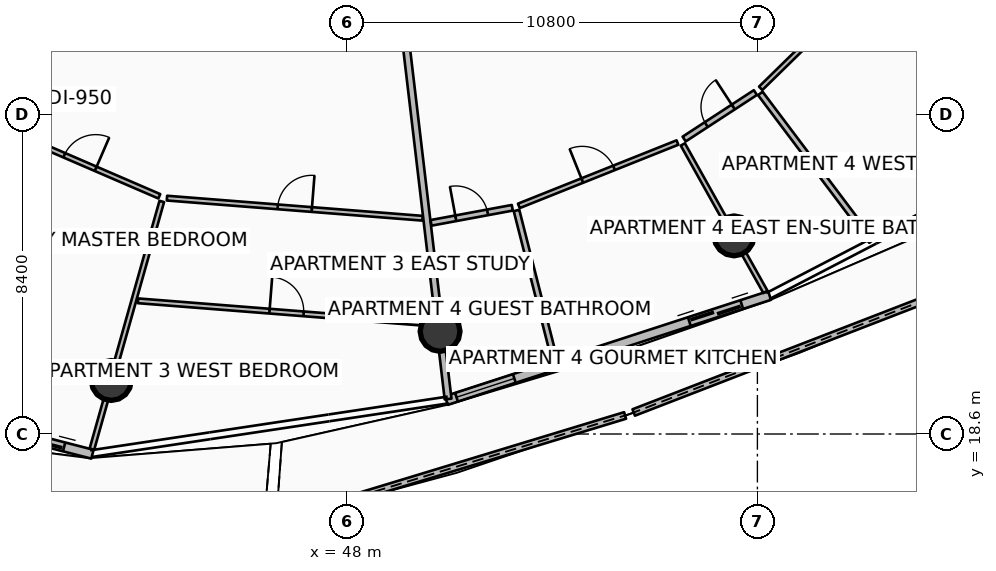
"""IFC4 building model, lengths in metres.
Left out: names, types, materials, properties, quantities, classifications, styles, units other than length and angle.
Written with IfcOpenShell. Run it as: python <this file> out.ifc"""

import sys

from ifc_helpers import new_model, si_unit, direction, frame, frame_2d, origin, origin_2d, place, context, subcontext, project, spatial, polyline, rectangle, circle, outline, extrude, element, fill, save


model = new_model("IFC4")
c1 = context("Model", 3, precision=1e-05, world=origin(), true_north=direction((0.0, 1.0)))
c2 = subcontext(c1, "Body", "Model", "MODEL_VIEW")
j1 = project(units=[si_unit("LENGTHUNIT", "METRE"), si_unit("PLANEANGLEUNIT", "RADIAN")], contexts=[c1])
p1 = place(None, origin())
s1 = spatial("IfcSite", under=j1, at=p1, CompositionType="ELEMENT")
p2 = place(p1, origin())
s2 = spatial("IfcBuilding", under=s1, at=p2, CompositionType="ELEMENT")
p3 = place(p2, frame((0.0, 0.0, 210.3)))
s3 = spatial("IfcBuildingStorey", under=s2, at=p3, CompositionType="ELEMENT", Elevation=210.3)
for number, where, z_axis, x_axis in (
    (1, (41.798, 20.008, 0.0), (0.0, 0.0, 1.0), (1.0, 0.0, 0.0)),
    (2, (50.45, 21.3, 0.0), (0.0, 0.0, 1.0), (1.0, 0.0, 0.0)),
    (3, (58.185, 23.814, 0.0), (0.0, 0.0, 1.0), (1.0, 0.0, 0.0)),
):
    element("IfcColumn", number, at=place(p3, frame(where, z_axis=z_axis, x_axis=x_axis)), inside=s3, PredefinedType="COLUMN", context=c2, shape_type="SweptSolid", body=[
        extrude(circle(Radius=0.525, at=origin_2d()), origin(), (0.0, 0.0, 1.0), 3.5),
    ])
p4 = place(p3, frame((46.135, 16.298, 0.0), z_axis=(0.0, 0.0, 1.0), x_axis=(0.956822857871, 0.290671668135, 0.0)))
e4 = element("IfcWall", 4, at=p4, inside=s3, PredefinedType="PARAPET", context=c2, shape_type="SweptSolid", body=[
    extrude(outline(polyline([(0.0, 0.0), (9.598, 0.0), (9.598, 1.148), (4.799, 1.284), (0.0, 1.483), (0.0, 0.0)])), frame((0.0, 0.09, 0.0), z_axis=(0.0, -1.0, 0.0), x_axis=(1.0, 0.0, 0.0)), (0.0, 0.0, 1.0), 0.18),
])
p5 = place(p3, frame((55.545, 19.166, 0.0), z_axis=(0.0, 0.0, 1.0), x_axis=(0.932733135956, 0.360567465378, 0.0)))
e5 = element("IfcWall", 5, at=p5, inside=s3, PredefinedType="PARAPET", context=c2, shape_type="SweptSolid", body=[
    extrude(outline(polyline([(0.0, 0.0), (9.473, 0.0), (9.473, 1.224), (4.736, 1.127), (0.0, 1.148), (0.0, 0.0)])), frame((0.0, 0.09, 0.0), z_axis=(0.0, -1.0, 0.0), x_axis=(1.0, 0.0, 0.0)), (0.0, 0.0, 1.0), 0.18),
])
p6 = place(p3, frame((31.14, 20.687, 0.0), z_axis=(0.0, 0.0, 1.0), x_axis=(0.968374028006, -0.249502989727, 0.0)))
e6 = element("IfcWall", 6, at=p6, inside=s3, PredefinedType="SOLIDWALL", context=c2, shape_type="SweptSolid", body=[
    extrude(rectangle(XDim=10.494, YDim=0.24, at=frame_2d((5.247, 0.0))), origin(), (0.0, 0.0, 1.0), 2.45),
])
p7 = place(p6, frame((8.274, 0.0, 0.0)))
e7 = element("IfcOpeningElement", 7, at=p7, cuts=e6, PredefinedType="OPENING", context=c2, shape_type="SweptSolid", body=[
    extrude(rectangle(XDim=1.45, YDim=2.15, at=frame_2d((0.725, 1.075))), frame((0.0, 0.13, 0.0), z_axis=(0.0, -1.0, 0.0), x_axis=(1.0, 0.0, 0.0)), (0.0, 0.0, 1.0), 0.26),
])
p8 = place(p6, frame((0.28, 0.0, 0.65)))
e8 = element("IfcOpeningElement", 8, at=p8, cuts=e6, PredefinedType="OPENING", context=c2, shape_type="SweptSolid", body=[
    extrude(rectangle(XDim=1.6, YDim=1.5, at=frame_2d((0.8, 0.75))), frame((0.0, 0.13, 0.0), z_axis=(0.0, -1.0, 0.0), x_axis=(1.0, 0.0, 0.0)), (0.0, 0.0, 1.0), 0.26),
])
p9 = place(p3, frame((50.616, 19.481, 0.0), z_axis=(0.0, 0.0, 1.0), x_axis=(0.951058543936, 0.309010753869, 0.0)))
e9 = element("IfcWall", 9, at=p9, inside=s3, PredefinedType="SOLIDWALL", context=c2, shape_type="SweptSolid", body=[
    extrude(rectangle(XDim=8.942, YDim=0.24, at=frame_2d((4.471, 0.0))), origin(), (0.0, 0.0, 1.0), 2.45),
])
p10 = place(p9, frame((6.722, 0.0, 0.0)))
e10 = element("IfcOpeningElement", 10, at=p10, cuts=e9, PredefinedType="OPENING", context=c2, shape_type="SweptSolid", body=[
    extrude(rectangle(XDim=1.45, YDim=2.15, at=frame_2d((0.725, 1.075))), frame((0.0, 0.13, 0.0), z_axis=(0.0, -1.0, 0.0), x_axis=(1.0, 0.0, 0.0)), (0.0, 0.0, 1.0), 0.26),
])
p11 = place(p9, frame((0.28, 0.0, 0.65)))
e11 = element("IfcOpeningElement", 11, at=p11, cuts=e9, PredefinedType="OPENING", context=c2, shape_type="SweptSolid", body=[
    extrude(rectangle(XDim=1.6, YDim=1.5, at=frame_2d((0.8, 0.75))), frame((0.0, 0.13, 0.0), z_axis=(0.0, -1.0, 0.0), x_axis=(1.0, 0.0, 0.0)), (0.0, 0.0, 1.0), 0.26),
])
p12 = place(p3, frame((49.037, 33.241, 0.0), z_axis=(0.0, 0.0, 1.0), x_axis=(0.11753742895, -0.993068453228, 0.0)))
e12 = element("IfcWall", 12, at=p12, inside=s3, PredefinedType="PARTITIONING", context=c2, shape_type="SweptSolid", body=[
    extrude(rectangle(XDim=13.815, YDim=0.18, at=frame_2d((6.907, 0.0))), origin(), (0.0, 0.0, 1.0), 2.94),
])
p13 = place(p3, frame((38.888, 26.657, 0.0), z_axis=(0.0, 0.0, 1.0), x_axis=(0.918052580004, -0.396458648976, 0.0)))
e13 = element("IfcWall", 13, at=p13, inside=s3, PredefinedType="PARTITIONING", context=c2, shape_type="SweptSolid", body=[
    extrude(rectangle(XDim=4.546, YDim=0.125, at=frame_2d((2.273, 0.0))), origin(), (0.0, 0.0, 1.0), 2.94),
])
p14 = place(p13, frame((1.823, 0.0, 0.0)))
e14 = element("IfcOpeningElement", 14, at=p14, cuts=e13, PredefinedType="OPENING", context=c2, shape_type="SweptSolid", body=[
    extrude(rectangle(XDim=0.9, YDim=2.08, at=frame_2d((0.45, 1.04))), frame((0.0, 0.073, 0.0), z_axis=(0.0, -1.0, 0.0), x_axis=(1.0, 0.0, 0.0)), (0.0, 0.0, 1.0), 0.145),
])
p15 = place(p3, frame((43.126, 24.719, 0.0), z_axis=(0.0, 0.0, 1.0), x_axis=(-0.271429339147, -0.962458369931, 0.0)))
e15 = element("IfcWall", 15, at=p15, inside=s3, PredefinedType="PARTITIONING", context=c2, shape_type="SweptSolid", body=[
    extrude(rectangle(XDim=6.772, YDim=0.125, at=frame_2d((3.386, 0.0))), origin(), (0.0, 0.0, 1.0), 2.94),
])
p16 = place(p3, frame((43.263, 24.807, 0.0), z_axis=(0.0, 0.0, 1.0), x_axis=(0.996914936791, -0.078489545824, 0.0)))
e16 = element("IfcWall", 16, at=p16, inside=s3, PredefinedType="PARTITIONING", context=c2, shape_type="SweptSolid", body=[
    extrude(rectangle(XDim=6.747, YDim=0.125, at=frame_2d((3.373, 0.0))), origin(), (0.0, 0.0, 1.0), 2.94),
])
p17 = place(p16, frame((2.923, 0.0, 0.0)))
e17 = element("IfcOpeningElement", 17, at=p17, cuts=e16, PredefinedType="OPENING", context=c2, shape_type="SweptSolid", body=[
    extrude(rectangle(XDim=0.9, YDim=2.08, at=frame_2d((0.45, 1.04))), frame((0.0, 0.073, 0.0), z_axis=(0.0, -1.0, 0.0), x_axis=(1.0, 0.0, 0.0)), (0.0, 0.0, 1.0), 0.145),
])
p18 = place(p3, frame((42.501, 22.105, 0.0), z_axis=(0.0, 0.0, 1.0), x_axis=(0.996917595152, -0.078455774017, 0.0)))
e18 = element("IfcWall", 18, at=p18, inside=s3, PredefinedType="PARTITIONING", context=c2, shape_type="SweptSolid", body=[
    extrude(rectangle(XDim=7.842, YDim=0.125, at=frame_2d((3.921, 0.0))), origin(), (0.0, 0.0, 1.0), 2.94),
])
p19 = place(p18, frame((3.471, 0.0, 0.0)))
e19 = element("IfcOpeningElement", 19, at=p19, cuts=e18, PredefinedType="OPENING", context=c2, shape_type="SweptSolid", body=[
    extrude(rectangle(XDim=0.9, YDim=2.08, at=frame_2d((0.45, 1.04))), frame((0.0, 0.073, 0.0), z_axis=(0.0, -1.0, 0.0), x_axis=(1.0, 0.0, 0.0)), (0.0, 0.0, 1.0), 0.145),
])
p20 = place(p3, frame((50.212, 24.156, 0.0), z_axis=(0.0, 0.0, 1.0), x_axis=(0.983198523617, 0.182539483832, 0.0)))
e20 = element("IfcWall", 20, at=p20, inside=s3, PredefinedType="PARTITIONING", context=c2, shape_type="SweptSolid", body=[
    extrude(rectangle(XDim=2.175, YDim=0.15, at=frame_2d((1.087, 0.0))), origin(), (0.0, 0.0, 1.0), 2.94),
])
p21 = place(p20, frame((0.662, 0.0, 0.0)))
e21 = element("IfcOpeningElement", 21, at=p21, cuts=e20, PredefinedType="OPENING", context=c2, shape_type="SweptSolid", body=[
    extrude(rectangle(XDim=0.85, YDim=2.06, at=frame_2d((0.425, 1.03))), frame((0.0, 0.085, 0.0), z_axis=(0.0, -1.0, 0.0), x_axis=(1.0, 0.0, 0.0)), (0.0, 0.0, 1.0), 0.17),
])
p22 = place(p3, frame((52.461, 24.482, 0.0), z_axis=(0.0, 0.0, 1.0), x_axis=(0.246781707717, -0.969071095811, 0.0)))
e22 = element("IfcWall", 22, at=p22, inside=s3, PredefinedType="PARTITIONING", context=c2, shape_type="SweptSolid", body=[
    extrude(rectangle(XDim=4.07, YDim=0.15, at=frame_2d((2.035, 0.0))), origin(), (0.0, 0.0, 1.0), 2.94),
])
p23 = place(p3, frame((52.523, 24.603, 0.0), z_axis=(0.0, 0.0, 1.0), x_axis=(0.928686374253, 0.370866038182, 0.0)))
e23 = element("IfcWall", 23, at=p23, inside=s3, PredefinedType="PARTITIONING", context=c2, shape_type="SweptSolid", body=[
    extrude(rectangle(XDim=4.494, YDim=0.125, at=frame_2d((2.247, 0.0))), origin(), (0.0, 0.0, 1.0), 2.94),
])
p24 = place(p23, frame((1.797, 0.0, 0.0)))
e24 = element("IfcOpeningElement", 24, at=p24, cuts=e23, PredefinedType="OPENING", context=c2, shape_type="SweptSolid", body=[
    extrude(rectangle(XDim=0.9, YDim=2.08, at=frame_2d((0.45, 1.04))), frame((0.0, 0.073, 0.0), z_axis=(0.0, -1.0, 0.0), x_axis=(1.0, 0.0, 0.0)), (0.0, 0.0, 1.0), 0.145),
])
p25 = place(p3, frame((56.838, 26.219, 0.0), z_axis=(0.0, 0.0, 1.0), x_axis=(0.488608382443, -0.872503208365, 0.0)))
e25 = element("IfcWall", 25, at=p25, inside=s3, PredefinedType="PARTITIONING", context=c2, shape_type="SweptSolid", body=[
    extrude(rectangle(XDim=4.448, YDim=0.125, at=frame_2d((2.224, 0.0))), origin(), (0.0, 0.0, 1.0), 2.94),
])
p26 = place(p3, frame((56.873, 26.361, 0.0), z_axis=(0.0, 0.0, 1.0), x_axis=(0.837497725381, 0.54644081105, 0.0)))
e26 = element("IfcWall", 26, at=p26, inside=s3, PredefinedType="PARTITIONING", context=c2, shape_type="SweptSolid", body=[
    extrude(rectangle(XDim=2.238, YDim=0.15, at=frame_2d((1.119, 0.0))), origin(), (0.0, 0.0, 1.0), 2.94),
])
p27 = place(p26, frame((0.694, 0.0, 0.0)))
e27 = element("IfcOpeningElement", 27, at=p27, cuts=e26, PredefinedType="OPENING", context=c2, shape_type="SweptSolid", body=[
    extrude(rectangle(XDim=0.85, YDim=2.06, at=frame_2d((0.425, 1.03))), frame((0.0, 0.085, 0.0), z_axis=(0.0, -1.0, 0.0), x_axis=(1.0, 0.0, 0.0)), (0.0, 0.0, 1.0), 0.17),
])
p28 = place(p3, frame((58.876, 27.561, 0.0), z_axis=(0.0, 0.0, 1.0), x_axis=(0.601652635262, -0.798757852219, 0.0)))
e28 = element("IfcWall", 28, at=p28, inside=s3, PredefinedType="PARTITIONING", context=c2, shape_type="SweptSolid", body=[
    extrude(rectangle(XDim=4.865, YDim=0.15, at=frame_2d((2.433, 0.0))), origin(), (0.0, 0.0, 1.0), 2.94),
])
p29 = place(p3, frame((58.887, 27.696, 0.0), z_axis=(0.0, 0.0, 1.0), x_axis=(0.714833426799, 0.699294767556, 0.0)))
e29 = element("IfcWall", 29, at=p29, inside=s3, PredefinedType="PARTITIONING", context=c2, shape_type="SweptSolid", body=[
    extrude(rectangle(XDim=4.431, YDim=0.125, at=frame_2d((2.215, 0.0))), origin(), (0.0, 0.0, 1.0), 2.94),
])
p30 = place(p29, frame((1.765, 0.0, 0.0)))
e30 = element("IfcOpeningElement", 30, at=p30, cuts=e29, PredefinedType="OPENING", context=c2, shape_type="SweptSolid", body=[
    extrude(rectangle(XDim=0.9, YDim=2.08, at=frame_2d((0.45, 1.04))), frame((0.0, 0.073, 0.0), z_axis=(0.0, -1.0, 0.0), x_axis=(1.0, 0.0, 0.0)), (0.0, 0.0, 1.0), 0.145),
])
p31 = place(p3, frame((62.204, 30.802, 0.0), z_axis=(0.0, 0.0, 1.0), x_axis=(0.785315561472, -0.619095686393, 0.0)))
e31 = element("IfcWall", 31, at=p31, inside=s3, PredefinedType="PARTITIONING", context=c2, shape_type="SweptSolid", body=[
    extrude(rectangle(XDim=6.74, YDim=0.125, at=frame_2d((3.37, 0.0))), origin(), (0.0, 0.0, 1.0), 2.94),
])
p32 = place(p7, origin())
e32 = element("IfcDoor", 32, at=p32, inside=s3, OperationType="DOUBLE_DOOR_SLIDING", PredefinedType="DOOR", context=c2, shape_type="SweptSolid", body=[
    extrude(rectangle(XDim=1.45, YDim=2.15, at=frame_2d((0.725, 1.075))), frame((0.0, 0.025, 0.0), z_axis=(0.0, -1.0, 0.0), x_axis=(1.0, 0.0, 0.0)), (0.0, 0.0, 1.0), 0.05),
])
fill(e7, e32)
p33 = place(p10, origin())
e33 = element("IfcDoor", 33, at=p33, inside=s3, OperationType="DOUBLE_DOOR_SLIDING", PredefinedType="DOOR", context=c2, shape_type="SweptSolid", body=[
    extrude(rectangle(XDim=1.45, YDim=2.15, at=frame_2d((0.725, 1.075))), frame((0.0, 0.025, 0.0), z_axis=(0.0, -1.0, 0.0), x_axis=(1.0, 0.0, 0.0)), (0.0, 0.0, 1.0), 0.05),
])
fill(e10, e33)
p34 = place(p11, origin())
e34 = element("IfcWindow", 34, at=p34, inside=s3, PartitioningType="SINGLE_PANEL", PredefinedType="WINDOW", context=c2, shape_type="SweptSolid", body=[
    extrude(rectangle(XDim=1.6, YDim=1.5, at=frame_2d((0.8, 0.75))), frame((0.0, 0.03, 0.0), z_axis=(0.0, -1.0, 0.0), x_axis=(1.0, 0.0, 0.0)), (0.0, 0.0, 1.0), 0.06),
])
fill(e11, e34)
p35 = place(p14, origin())
e35 = element("IfcDoor", 35, at=p35, inside=s3, OperationType="SINGLE_SWING_RIGHT", PredefinedType="DOOR", context=c2, shape_type="SweptSolid", body=[
    extrude(rectangle(XDim=0.9, YDim=2.08, at=frame_2d((0.45, 1.04))), frame((0.0, 0.025, 0.0), z_axis=(0.0, -1.0, 0.0), x_axis=(1.0, 0.0, 0.0)), (0.0, 0.0, 1.0), 0.05),
])
fill(e14, e35)
p36 = place(p17, origin())
e36 = element("IfcDoor", 36, at=p36, inside=s3, OperationType="SINGLE_SWING_RIGHT", PredefinedType="DOOR", context=c2, shape_type="SweptSolid", body=[
    extrude(rectangle(XDim=0.9, YDim=2.08, at=frame_2d((0.45, 1.04))), frame((0.0, 0.025, 0.0), z_axis=(0.0, -1.0, 0.0), x_axis=(1.0, 0.0, 0.0)), (0.0, 0.0, 1.0), 0.05),
])
fill(e17, e36)
p37 = place(p19, origin())
e37 = element("IfcDoor", 37, at=p37, inside=s3, OperationType="SINGLE_SWING_LEFT", PredefinedType="DOOR", context=c2, shape_type="SweptSolid", body=[
    extrude(rectangle(XDim=0.9, YDim=2.08, at=frame_2d((0.45, 1.04))), frame((0.0, 0.025, 0.0), z_axis=(0.0, -1.0, 0.0), x_axis=(1.0, 0.0, 0.0)), (0.0, 0.0, 1.0), 0.05),
])
fill(e19, e37)
p38 = place(p21, origin())
e38 = element("IfcDoor", 38, at=p38, inside=s3, OperationType="SINGLE_SWING_LEFT", PredefinedType="DOOR", context=c2, shape_type="SweptSolid", body=[
    extrude(rectangle(XDim=0.85, YDim=2.06, at=frame_2d((0.425, 1.03))), frame((0.0, 0.025, 0.0), z_axis=(0.0, -1.0, 0.0), x_axis=(1.0, 0.0, 0.0)), (0.0, 0.0, 1.0), 0.05),
])
fill(e21, e38)
p39 = place(p24, origin())
e39 = element("IfcDoor", 39, at=p39, inside=s3, OperationType="SINGLE_SWING_LEFT", PredefinedType="DOOR", context=c2, shape_type="SweptSolid", body=[
    extrude(rectangle(XDim=0.9, YDim=2.08, at=frame_2d((0.45, 1.04))), frame((0.0, 0.025, 0.0), z_axis=(0.0, -1.0, 0.0), x_axis=(1.0, 0.0, 0.0)), (0.0, 0.0, 1.0), 0.05),
])
fill(e24, e39)
p40 = place(p27, origin())
e40 = element("IfcDoor", 40, at=p40, inside=s3, OperationType="SINGLE_SWING_RIGHT", PredefinedType="DOOR", context=c2, shape_type="SweptSolid", body=[
    extrude(rectangle(XDim=0.85, YDim=2.06, at=frame_2d((0.425, 1.03))), frame((0.0, 0.025, 0.0), z_axis=(0.0, -1.0, 0.0), x_axis=(1.0, 0.0, 0.0)), (0.0, 0.0, 1.0), 0.05),
])
fill(e27, e40)
save(model, sys.argv[1])
